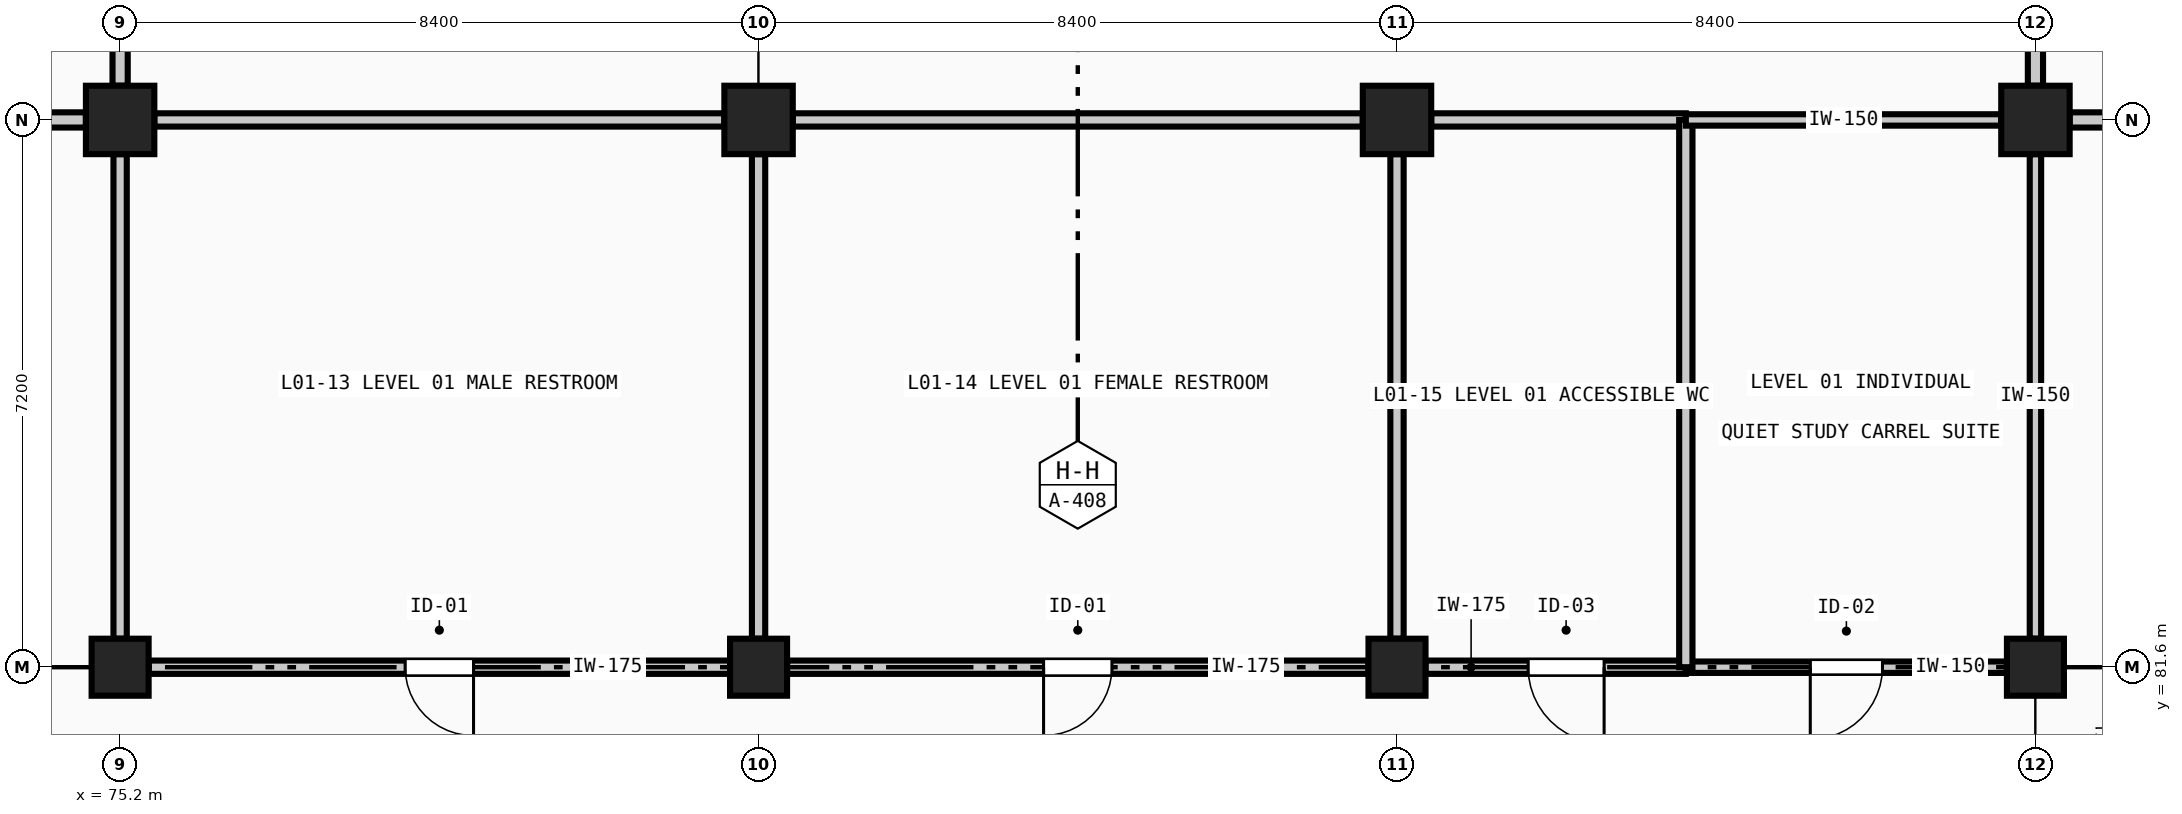
"""IFC4 building model, lengths in metres.
Left out: names, types, materials, properties, quantities, classifications, styles, units other than length and angle.
Written with IfcOpenShell. Run it as: python <this file> out.ifc"""

import sys

from ifc_helpers import new_model, si_unit, direction, frame, frame_2d, origin, origin_2d, place, context, subcontext, project, spatial, rectangle, extrude, element, fill, save


model = new_model("IFC4")
c1 = context("Model", 3, precision=1e-05, world=origin(), true_north=direction((0.0, 1.0)))
c2 = subcontext(c1, "Body", "Model", "MODEL_VIEW")
j1 = project(units=[si_unit("LENGTHUNIT", "METRE"), si_unit("PLANEANGLEUNIT", "RADIAN")], contexts=[c1])
p1 = place(None, origin())
s1 = spatial("IfcSite", under=j1, at=p1, CompositionType="ELEMENT")
p2 = place(p1, origin())
s2 = spatial("IfcBuilding", under=s1, at=p2, CompositionType="ELEMENT")
p3 = place(p2, frame((0.0, 0.0, 4.8)))
s3 = spatial("IfcBuildingStorey", under=s2, at=p3, CompositionType="ELEMENT", Elevation=4.8)
p4 = place(p3, frame((75.2, 81.6, 0.0), z_axis=(0.0, 0.0, 1.0), x_axis=(1.0, 0.0, 0.0)))
e1 = element("IfcColumn", 1, at=p4, inside=s3, PredefinedType="COLUMN", context=c2, shape_type="SweptSolid", body=[
    extrude(rectangle(XDim=0.75, YDim=0.75, at=origin_2d()), origin(), (0.0, 0.0, 1.0), 4.8),
])
p5 = place(p3, frame((75.2, 88.8, 0.0), z_axis=(0.0, 0.0, 1.0), x_axis=(1.0, 0.0, 0.0)))
e2 = element("IfcColumn", 2, at=p5, inside=s3, PredefinedType="COLUMN", context=c2, shape_type="SweptSolid", body=[
    extrude(rectangle(XDim=0.9, YDim=0.9, at=origin_2d()), origin(), (0.0, 0.0, 1.0), 4.8),
])
p6 = place(p3, frame((83.6, 81.6, 0.0), z_axis=(0.0, 0.0, 1.0), x_axis=(1.0, 0.0, 0.0)))
e3 = element("IfcColumn", 3, at=p6, inside=s3, PredefinedType="COLUMN", context=c2, shape_type="SweptSolid", body=[
    extrude(rectangle(XDim=0.75, YDim=0.75, at=origin_2d()), origin(), (0.0, 0.0, 1.0), 4.8),
])
p7 = place(p3, frame((83.6, 88.8, 0.0), z_axis=(0.0, 0.0, 1.0), x_axis=(1.0, 0.0, 0.0)))
e4 = element("IfcColumn", 4, at=p7, inside=s3, PredefinedType="COLUMN", context=c2, shape_type="SweptSolid", body=[
    extrude(rectangle(XDim=0.9, YDim=0.9, at=origin_2d()), origin(), (0.0, 0.0, 1.0), 4.8),
])
p8 = place(p3, frame((92.0, 81.6, 0.0), z_axis=(0.0, 0.0, 1.0), x_axis=(1.0, 0.0, 0.0)))
e5 = element("IfcColumn", 5, at=p8, inside=s3, PredefinedType="COLUMN", context=c2, shape_type="SweptSolid", body=[
    extrude(rectangle(XDim=0.75, YDim=0.75, at=origin_2d()), origin(), (0.0, 0.0, 1.0), 4.8),
])
p9 = place(p3, frame((92.0, 88.8, 0.0), z_axis=(0.0, 0.0, 1.0), x_axis=(1.0, 0.0, 0.0)))
e6 = element("IfcColumn", 6, at=p9, inside=s3, PredefinedType="COLUMN", context=c2, shape_type="SweptSolid", body=[
    extrude(rectangle(XDim=0.9, YDim=0.9, at=origin_2d()), origin(), (0.0, 0.0, 1.0), 4.8),
])
p10 = place(p3, frame((100.4, 81.6, 0.0), z_axis=(0.0, 0.0, 1.0), x_axis=(1.0, 0.0, 0.0)))
e7 = element("IfcColumn", 7, at=p10, inside=s3, PredefinedType="COLUMN", context=c2, shape_type="SweptSolid", body=[
    extrude(rectangle(XDim=0.75, YDim=0.75, at=origin_2d()), origin(), (0.0, 0.0, 1.0), 4.8),
])
p11 = place(p3, frame((100.4, 88.8, 0.0), z_axis=(0.0, 0.0, 1.0), x_axis=(1.0, 0.0, 0.0)))
e8 = element("IfcColumn", 8, at=p11, inside=s3, PredefinedType="COLUMN", context=c2, shape_type="SweptSolid", body=[
    extrude(rectangle(XDim=0.9, YDim=0.9, at=origin_2d()), origin(), (0.0, 0.0, 1.0), 4.8),
])
p12 = place(p3, frame((83.225, 81.6, 0.0), z_axis=(0.0, 0.0, 1.0), x_axis=(-1.0, 0.0, 0.0)))
e9 = element("IfcWall", 9, at=p12, inside=s3, PredefinedType="PLUMBINGWALL", context=c2, shape_type="SweptSolid", body=[
    extrude(rectangle(XDim=7.65, YDim=0.175, at=frame_2d((3.825, 0.0))), origin(), (0.0, 0.0, 1.0), 4.0),
])
p13 = place(p12, frame((3.375, 0.0, 0.0)))
e10 = element("IfcOpeningElement", 10, at=p13, cuts=e9, PredefinedType="OPENING", context=c2, shape_type="SweptSolid", body=[
    extrude(rectangle(XDim=0.9, YDim=2.1, at=frame_2d((0.45, 1.05))), frame((0.0, 0.097, 0.0), z_axis=(0.0, -1.0, 0.0), x_axis=(1.0, 0.0, 0.0)), (0.0, 0.0, 1.0), 0.195),
])
p14 = place(p3, frame((91.625, 81.6, 0.0), z_axis=(0.0, 0.0, 1.0), x_axis=(-1.0, 0.0, 0.0)))
e11 = element("IfcWall", 11, at=p14, inside=s3, PredefinedType="PLUMBINGWALL", context=c2, shape_type="SweptSolid", body=[
    extrude(rectangle(XDim=7.65, YDim=0.175, at=frame_2d((3.825, 0.0))), origin(), (0.0, 0.0, 1.0), 4.0),
])
p15 = place(p14, frame((3.375, 0.0, 0.0)))
e12 = element("IfcOpeningElement", 12, at=p15, cuts=e11, PredefinedType="OPENING", context=c2, shape_type="SweptSolid", body=[
    extrude(rectangle(XDim=0.9, YDim=2.1, at=frame_2d((0.45, 1.05))), frame((0.0, 0.097, 0.0), z_axis=(0.0, -1.0, 0.0), x_axis=(1.0, 0.0, 0.0)), (0.0, 0.0, 1.0), 0.195),
])
p16 = place(p3, frame((95.8, 81.6, 0.0), z_axis=(0.0, 0.0, 1.0), x_axis=(-1.0, 0.0, 0.0)))
e13 = element("IfcWall", 13, at=p16, inside=s3, PredefinedType="PLUMBINGWALL", context=c2, shape_type="SweptSolid", body=[
    extrude(rectangle(XDim=3.425, YDim=0.175, at=frame_2d((1.712, 0.0))), origin(), (0.0, 0.0, 1.0), 4.0),
])
p17 = place(p16, frame((1.075, 0.0, 0.0)))
e14 = element("IfcOpeningElement", 14, at=p17, cuts=e13, PredefinedType="OPENING", context=c2, shape_type="SweptSolid", body=[
    extrude(rectangle(XDim=1.0, YDim=2.15, at=frame_2d((0.5, 1.075))), frame((0.0, 0.097, 0.0), z_axis=(0.0, -1.0, 0.0), x_axis=(1.0, 0.0, 0.0)), (0.0, 0.0, 1.0), 0.195),
])
p18 = place(p3, frame((100.025, 81.6, 0.0), z_axis=(0.0, 0.0, 1.0), x_axis=(-1.0, 0.0, 0.0)))
e15 = element("IfcWall", 15, at=p18, inside=s3, PredefinedType="PARTITIONING", context=c2, shape_type="SweptSolid", body=[
    extrude(rectangle(XDim=4.225, YDim=0.15, at=frame_2d((2.112, 0.0))), origin(), (0.0, 0.0, 1.0), 4.0),
])
p19 = place(p18, frame((1.637, 0.0, 0.0)))
e16 = element("IfcOpeningElement", 16, at=p19, cuts=e15, PredefinedType="OPENING", context=c2, shape_type="SweptSolid", body=[
    extrude(rectangle(XDim=0.95, YDim=2.15, at=frame_2d((0.475, 1.075))), frame((0.0, 0.085, 0.0), z_axis=(0.0, -1.0, 0.0), x_axis=(1.0, 0.0, 0.0)), (0.0, 0.0, 1.0), 0.17),
])
p20 = place(p3, frame((74.75, 88.8, 0.0), z_axis=(0.0, 0.0, 1.0), x_axis=(-1.0, 0.0, 0.0)))
e17 = element("IfcWall", 17, at=p20, inside=s3, PredefinedType="PARTITIONING", context=c2, shape_type="SweptSolid", body=[
    extrude(rectangle(XDim=7.5, YDim=0.2, at=frame_2d((3.75, 0.0))), origin(), (0.0, 0.0, 1.0), 3.85),
])
p21 = place(p3, frame((75.2, 93.1, 0.0), z_axis=(0.0, 0.0, 1.0), x_axis=(0.0, -1.0, 0.0)))
e18 = element("IfcWall", 18, at=p21, inside=s3, PredefinedType="PARTITIONING", context=c2, shape_type="SweptSolid", body=[
    extrude(rectangle(XDim=3.85, YDim=0.2, at=frame_2d((1.925, 0.0))), origin(), (0.0, 0.0, 1.0), 3.85),
])
p22 = place(p3, frame((108.35, 88.8, 0.0), z_axis=(0.0, 0.0, 1.0), x_axis=(-1.0, 0.0, 0.0)))
e19 = element("IfcWall", 19, at=p22, inside=s3, PredefinedType="PARTITIONING", context=c2, shape_type="SweptSolid", body=[
    extrude(rectangle(XDim=7.5, YDim=0.2, at=frame_2d((3.75, 0.0))), origin(), (0.0, 0.0, 1.0), 3.85),
])
p23 = place(p3, frame((100.4, 89.25, 0.0), z_axis=(0.0, 0.0, 1.0), x_axis=(0.0, 1.0, 0.0)))
e20 = element("IfcWall", 20, at=p23, inside=s3, PredefinedType="PARTITIONING", context=c2, shape_type="SweptSolid", body=[
    extrude(rectangle(XDim=3.85, YDim=0.2, at=frame_2d((1.925, 0.0))), origin(), (0.0, 0.0, 1.0), 3.85),
])
p24 = place(p3, frame((75.65, 88.8, 0.0), z_axis=(0.0, 0.0, 1.0), x_axis=(1.0, 0.0, 0.0)))
e21 = element("IfcWall", 21, at=p24, inside=s3, PredefinedType="PLUMBINGWALL", context=c2, shape_type="SweptSolid", body=[
    extrude(rectangle(XDim=7.5, YDim=0.175, at=frame_2d((3.75, 0.0))), origin(), (0.0, 0.0, 1.0), 3.85),
])
for number, where, z_axis, x_axis in (
    (22, (75.2, 81.975, 0.0), (0.0, 0.0, 1.0), (0.0, 1.0, 0.0)),
    (23, (83.6, 88.35, 0.0), (0.0, 0.0, 1.0), (0.0, -1.0, 0.0)),
):
    element("IfcWall", number, at=place(p3, frame(where, z_axis=z_axis, x_axis=x_axis)), inside=s3, PredefinedType="PLUMBINGWALL", context=c2, shape_type="SweptSolid", body=[
        extrude(rectangle(XDim=6.375, YDim=0.175, at=frame_2d((3.188, 0.0))), origin(), (0.0, 0.0, 1.0), 4.05),
    ])
p25 = place(p3, frame((84.05, 88.8, 0.0), z_axis=(0.0, 0.0, 1.0), x_axis=(1.0, 0.0, 0.0)))
e24 = element("IfcWall", 24, at=p25, inside=s3, PredefinedType="PLUMBINGWALL", context=c2, shape_type="SweptSolid", body=[
    extrude(rectangle(XDim=7.5, YDim=0.175, at=frame_2d((3.75, 0.0))), origin(), (0.0, 0.0, 1.0), 3.85),
])
p26 = place(p3, frame((92.0, 88.35, 0.0), z_axis=(0.0, 0.0, 1.0), x_axis=(0.0, -1.0, 0.0)))
e25 = element("IfcWall", 25, at=p26, inside=s3, PredefinedType="PLUMBINGWALL", context=c2, shape_type="SweptSolid", body=[
    extrude(rectangle(XDim=6.375, YDim=0.175, at=frame_2d((3.188, 0.0))), origin(), (0.0, 0.0, 1.0), 4.05),
])
p27 = place(p3, frame((92.45, 88.8, 0.0), z_axis=(0.0, 0.0, 1.0), x_axis=(1.0, 0.0, 0.0)))
e26 = element("IfcWall", 26, at=p27, inside=s3, PredefinedType="PLUMBINGWALL", context=c2, shape_type="SweptSolid", body=[
    extrude(rectangle(XDim=3.35, YDim=0.175, at=frame_2d((1.675, 0.0))), origin(), (0.0, 0.0, 1.0), 3.85),
])
p28 = place(p3, frame((95.8, 88.8, 0.0), z_axis=(0.0, 0.0, 1.0), x_axis=(0.0, -1.0, 0.0)))
e27 = element("IfcWall", 27, at=p28, inside=s3, PredefinedType="PLUMBINGWALL", context=c2, shape_type="SweptSolid", body=[
    extrude(rectangle(XDim=7.2, YDim=0.175, at=frame_2d((3.6, 0.0))), origin(), (0.0, 0.0, 1.0), 4.5),
])
p29 = place(p3, frame((95.8, 88.8, 0.0), z_axis=(0.0, 0.0, 1.0), x_axis=(1.0, 0.0, 0.0)))
e28 = element("IfcWall", 28, at=p29, inside=s3, PredefinedType="PARTITIONING", context=c2, shape_type="SweptSolid", body=[
    extrude(rectangle(XDim=4.15, YDim=0.15, at=frame_2d((2.075, 0.0))), origin(), (0.0, 0.0, 1.0), 3.85),
])
p30 = place(p3, frame((100.4, 88.35, 0.0), z_axis=(0.0, 0.0, 1.0), x_axis=(0.0, -1.0, 0.0)))
e29 = element("IfcWall", 29, at=p30, inside=s3, PredefinedType="PARTITIONING", context=c2, shape_type="SweptSolid", body=[
    extrude(rectangle(XDim=6.375, YDim=0.15, at=frame_2d((3.188, 0.0))), origin(), (0.0, 0.0, 1.0), 4.05),
])
p31 = place(p13, origin())
e30 = element("IfcDoor", 30, at=p31, inside=s3, OperationType="SINGLE_SWING_LEFT", PredefinedType="DOOR", context=c2, shape_type="SweptSolid", body=[
    extrude(rectangle(XDim=0.9, YDim=2.1, at=frame_2d((0.45, 1.05))), frame((0.0, 0.025, 0.0), z_axis=(0.0, -1.0, 0.0), x_axis=(1.0, 0.0, 0.0)), (0.0, 0.0, 1.0), 0.05),
])
fill(e10, e30)
p32 = place(p15, origin())
e31 = element("IfcDoor", 31, at=p32, inside=s3, OperationType="SINGLE_SWING_RIGHT", PredefinedType="DOOR", context=c2, shape_type="SweptSolid", body=[
    extrude(rectangle(XDim=0.9, YDim=2.1, at=frame_2d((0.45, 1.05))), frame((0.0, 0.025, 0.0), z_axis=(0.0, -1.0, 0.0), x_axis=(1.0, 0.0, 0.0)), (0.0, 0.0, 1.0), 0.05),
])
fill(e12, e31)
p33 = place(p17, origin())
e32 = element("IfcDoor", 32, at=p33, inside=s3, OperationType="SINGLE_SWING_LEFT", PredefinedType="DOOR", context=c2, shape_type="SweptSolid", body=[
    extrude(rectangle(XDim=1.0, YDim=2.15, at=frame_2d((0.5, 1.075))), frame((0.0, 0.025, 0.0), z_axis=(0.0, -1.0, 0.0), x_axis=(1.0, 0.0, 0.0)), (0.0, 0.0, 1.0), 0.05),
])
fill(e14, e32)
p34 = place(p19, origin())
e33 = element("IfcDoor", 33, at=p34, inside=s3, OperationType="SINGLE_SWING_RIGHT", PredefinedType="DOOR", context=c2, shape_type="SweptSolid", body=[
    extrude(rectangle(XDim=0.95, YDim=2.15, at=frame_2d((0.475, 1.075))), frame((0.0, 0.025, 0.0), z_axis=(0.0, -1.0, 0.0), x_axis=(1.0, 0.0, 0.0)), (0.0, 0.0, 1.0), 0.05),
])
fill(e16, e33)
save(model, sys.argv[1])
